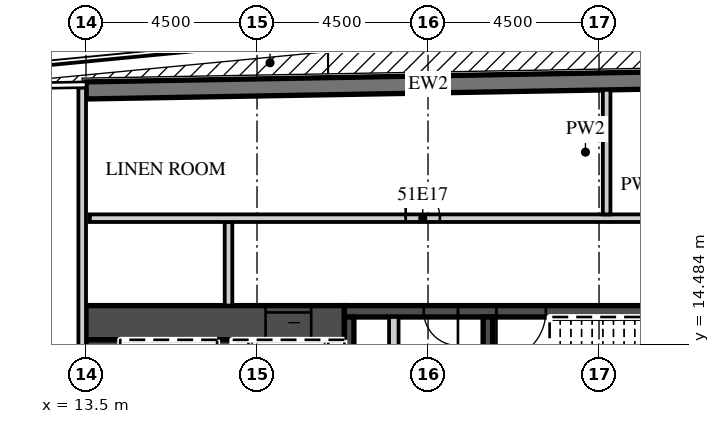
"""IFC4 building model, lengths in metres.
Left out: names, types, materials, properties, quantities, classifications, styles, units other than length and angle.
Written with IfcOpenShell. Run it as: python <this file> out.ifc"""

import sys

from ifc_helpers import new_model, si_unit, direction, frame, frame_2d, origin, place, context, subcontext, project, spatial, rectangle, extrude, element, fill, save


model = new_model("IFC4")
c1 = context("Model", 3, precision=1e-05, world=origin(), true_north=direction((0.0, 1.0)))
c2 = subcontext(c1, "Body", "Model", "MODEL_VIEW")
j1 = project(units=[si_unit("LENGTHUNIT", "METRE"), si_unit("PLANEANGLEUNIT", "RADIAN")], contexts=[c1])
p1 = place(None, origin())
s1 = spatial("IfcSite", under=j1, at=p1, CompositionType="ELEMENT")
p2 = place(p1, origin())
s2 = spatial("IfcBuilding", under=s1, at=p2, CompositionType="ELEMENT")
p3 = place(p2, frame((0.0, 0.0, 211.1)))
s3 = spatial("IfcBuildingStorey", under=s2, at=p3, CompositionType="ELEMENT", Elevation=211.1)
p4 = place(p3, frame((31.504, 21.476, 0.0), z_axis=(0.0, 0.0, 1.0), x_axis=(-0.999847677887, -0.017453395744, 0.0)))
e1 = element("IfcWall", 1, at=p4, inside=s3, PredefinedType="SOLIDWALL", context=c2, shape_type="SweptSolid", body=[
    extrude(rectangle(XDim=18.003, YDim=0.45, at=frame_2d((9.001, 0.0))), origin(), (0.0, 0.0, 1.0), 6.32),
])
p5 = place(p3, frame((13.5, 15.05, 0.0), z_axis=(0.0, 0.0, 1.0), x_axis=(1.0, 0.0, 0.0)))
e2 = element("IfcWall", 2, at=p5, inside=s3, PredefinedType="SHEAR", context=c2, shape_type="SweptSolid", body=[
    extrude(rectangle(XDim=6.8, YDim=0.9, at=frame_2d((3.4, 0.0))), origin(), (0.0, 0.0, 1.0), 6.32),
])
p6 = place(p5, frame((4.725, 0.0, 0.0)))
e3 = element("IfcOpeningElement", 3, at=p6, cuts=e2, PredefinedType="OPENING", context=c2, shape_type="SweptSolid", body=[
    extrude(rectangle(XDim=1.2, YDim=2.1, at=frame_2d((0.6, 1.05))), frame((0.0, 0.46, 0.0), z_axis=(0.0, -1.0, 0.0), x_axis=(1.0, 0.0, 0.0)), (0.0, 0.0, 1.0), 0.92),
])
p7 = place(p3, frame((20.3, 15.35, 0.0), z_axis=(0.0, 0.0, 1.0), x_axis=(1.0, 0.0, 0.0)))
e4 = element("IfcWall", 4, at=p7, inside=s3, PredefinedType="SHEAR", context=c2, shape_type="SweptSolid", body=[
    extrude(rectangle(XDim=10.3, YDim=0.3, at=frame_2d((5.15, 0.0))), origin(), (0.0, 0.0, 1.0), 6.32),
])
p8 = place(p7, frame((4.0, 0.0, 0.0)))
e5 = element("IfcOpeningElement", 5, at=p8, cuts=e4, PredefinedType="OPENING", context=c2, shape_type="SweptSolid", body=[
    extrude(rectangle(XDim=1.3, YDim=2.1, at=frame_2d((0.65, 1.05))), frame((0.0, 0.16, 0.0), z_axis=(0.0, -1.0, 0.0), x_axis=(1.0, 0.0, 0.0)), (0.0, 0.0, 1.0), 0.32),
])
p9 = place(p7, frame((2.087, 0.0, 0.0)))
e6 = element("IfcOpeningElement", 6, at=p9, cuts=e4, PredefinedType="OPENING", context=c2, shape_type="SweptSolid", body=[
    extrude(rectangle(XDim=0.9, YDim=2.1, at=frame_2d((0.45, 1.05))), frame((0.0, 0.16, 0.0), z_axis=(0.0, -1.0, 0.0), x_axis=(1.0, 0.0, 0.0)), (0.0, 0.0, 1.0), 0.32),
])
p10 = place(p3, frame((13.95, 2.4, 0.0), z_axis=(0.0, 0.0, 1.0), x_axis=(0.0, 1.0, 0.0)))
e7 = element("IfcWall", 7, at=p10, inside=s3, PredefinedType="SHEAR", context=c2, shape_type="SweptSolid", body=[
    extrude(rectangle(XDim=12.2, YDim=0.9, at=frame_2d((6.1, 0.0))), origin(), (0.0, 0.0, 1.0), 6.32),
])
p11 = place(p3, frame((17.15, 8.8, 0.0), z_axis=(0.0, 0.0, 1.0), x_axis=(0.0, 1.0, 0.0)))
e8 = element("IfcWall", 8, at=p11, inside=s3, PredefinedType="SHEAR", context=c2, shape_type="SweptSolid", body=[
    extrude(rectangle(XDim=5.8, YDim=0.4, at=frame_2d((2.9, 0.0))), origin(), (0.0, 0.0, 1.0), 6.32),
])
for number, where, z_axis, x_axis in (
    (9, (20.425, 11.95, 0.0), (0.0, 0.0, 1.0), (0.0, 1.0, 0.0)),
    (10, (24.075, 11.95, 0.0), (0.0, 0.0, 1.0), (0.0, 1.0, 0.0)),
):
    element("IfcWall", number, at=place(p3, frame(where, z_axis=z_axis, x_axis=x_axis)), inside=s3, PredefinedType="SHEAR", context=c2, shape_type="SweptSolid", body=[
        extrude(rectangle(XDim=3.25, YDim=0.25, at=frame_2d((1.625, 0.0))), origin(), (0.0, 0.0, 1.0), 6.32),
    ])
p12 = place(p3, frame((21.6, 11.95, 0.0), z_axis=(0.0, 0.0, 1.0), x_axis=(0.0, 1.0, 0.0)))
e11 = element("IfcWall", 11, at=p12, inside=s3, PredefinedType="PARTITIONING", context=c2, shape_type="SweptSolid", body=[
    extrude(rectangle(XDim=3.25, YDim=0.25, at=frame_2d((1.625, 0.0))), origin(), (0.0, 0.0, 1.0), 6.32),
])
p13 = place(p3, frame((17.25, 15.5, 0.0), z_axis=(0.0, 0.0, 1.0), x_axis=(0.0, 1.0, 0.0)))
e12 = element("IfcWall", 12, at=p13, inside=s3, PredefinedType="PARTITIONING", context=c2, shape_type="SweptSolid", body=[
    extrude(rectangle(XDim=2.2, YDim=0.2, at=frame_2d((1.1, 0.0))), origin(), (0.0, 0.0, 1.0), 6.32),
])
p14 = place(p3, frame((13.6, 17.8, 0.0), z_axis=(0.0, 0.0, 1.0), x_axis=(1.0, 0.0, 0.0)))
e13 = element("IfcWall", 13, at=p14, inside=s3, PredefinedType="PARTITIONING", context=c2, shape_type="SweptSolid", body=[
    extrude(rectangle(XDim=28.958, YDim=0.2, at=frame_2d((14.479, 0.0))), origin(), (0.0, 0.0, 1.0), 6.32),
])
p15 = place(p14, frame((16.613, 0.0, 0.0)))
e14 = element("IfcOpeningElement", 14, at=p15, cuts=e13, PredefinedType="OPENING", context=c2, shape_type="SweptSolid", body=[
    extrude(rectangle(XDim=0.9, YDim=2.1, at=frame_2d((0.45, 1.05))), frame((0.0, 0.11, 0.0), z_axis=(0.0, -1.0, 0.0), x_axis=(1.0, 0.0, 0.0)), (0.0, 0.0, 1.0), 0.22),
])
p16 = place(p14, frame((8.312, 0.0, 0.0)))
e15 = element("IfcOpeningElement", 15, at=p16, cuts=e13, PredefinedType="OPENING", context=c2, shape_type="SweptSolid", body=[
    extrude(rectangle(XDim=0.9, YDim=2.1, at=frame_2d((0.45, 1.05))), frame((0.0, 0.11, 0.0), z_axis=(0.0, -1.0, 0.0), x_axis=(1.0, 0.0, 0.0)), (0.0, 0.0, 1.0), 0.22),
])
p17 = place(p3, frame((27.2, 17.9, 0.0), z_axis=(0.0, 0.0, 1.0), x_axis=(0.0, 1.0, 0.0)))
e16 = element("IfcWall", 16, at=p17, inside=s3, PredefinedType="PARTITIONING", context=c2, shape_type="SweptSolid", body=[
    extrude(rectangle(XDim=3.276, YDim=0.2, at=frame_2d((1.638, 0.0))), origin(), (0.0, 0.0, 1.0), 6.32),
])
p18 = place(p3, frame((13.4, 1.7, 0.0), z_axis=(0.0, 0.0, 1.0), x_axis=(0.0, 1.0, 0.0)))
e17 = element("IfcWall", 17, at=p18, inside=s3, PredefinedType="PARTITIONING", context=c2, shape_type="SweptSolid", body=[
    extrude(rectangle(XDim=19.535, YDim=0.2, at=frame_2d((9.767, 0.0))), origin(), (0.0, 0.0, 1.0), 6.32),
])
p19 = place(p6, origin())
e18 = element("IfcDoor", 18, at=p19, inside=s3, OperationType="SLIDING_TO_LEFT", PredefinedType="DOOR", context=c2, shape_type="SweptSolid", body=[
    extrude(rectangle(XDim=1.2, YDim=2.1, at=frame_2d((0.6, 1.05))), frame((0.0, 0.025, 0.0), z_axis=(0.0, -1.0, 0.0), x_axis=(1.0, 0.0, 0.0)), (0.0, 0.0, 1.0), 0.05),
])
fill(e3, e18)
p20 = place(p8, origin())
e19 = element("IfcDoor", 19, at=p20, inside=s3, OperationType="SINGLE_SWING_LEFT", PredefinedType="DOOR", context=c2, shape_type="SweptSolid", body=[
    extrude(rectangle(XDim=1.3, YDim=2.1, at=frame_2d((0.65, 1.05))), frame((0.0, 0.025, 0.0), z_axis=(0.0, -1.0, 0.0), x_axis=(1.0, 0.0, 0.0)), (0.0, 0.0, 1.0), 0.05),
])
fill(e5, e19)
p21 = place(p9, origin())
e20 = element("IfcDoor", 20, at=p21, inside=s3, OperationType="SINGLE_SWING_RIGHT", PredefinedType="DOOR", context=c2, shape_type="SweptSolid", body=[
    extrude(rectangle(XDim=0.9, YDim=2.1, at=frame_2d((0.45, 1.05))), frame((0.0, 0.025, 0.0), z_axis=(0.0, -1.0, 0.0), x_axis=(1.0, 0.0, 0.0)), (0.0, 0.0, 1.0), 0.05),
])
fill(e6, e20)
p22 = place(p16, origin())
e21 = element("IfcDoor", 21, at=p22, inside=s3, OperationType="SINGLE_SWING_LEFT", PredefinedType="DOOR", context=c2, shape_type="SweptSolid", body=[
    extrude(rectangle(XDim=0.9, YDim=2.1, at=frame_2d((0.45, 1.05))), frame((0.0, 0.025, 0.0), z_axis=(0.0, -1.0, 0.0), x_axis=(1.0, 0.0, 0.0)), (0.0, 0.0, 1.0), 0.05),
])
fill(e15, e21)
save(model, sys.argv[1])
